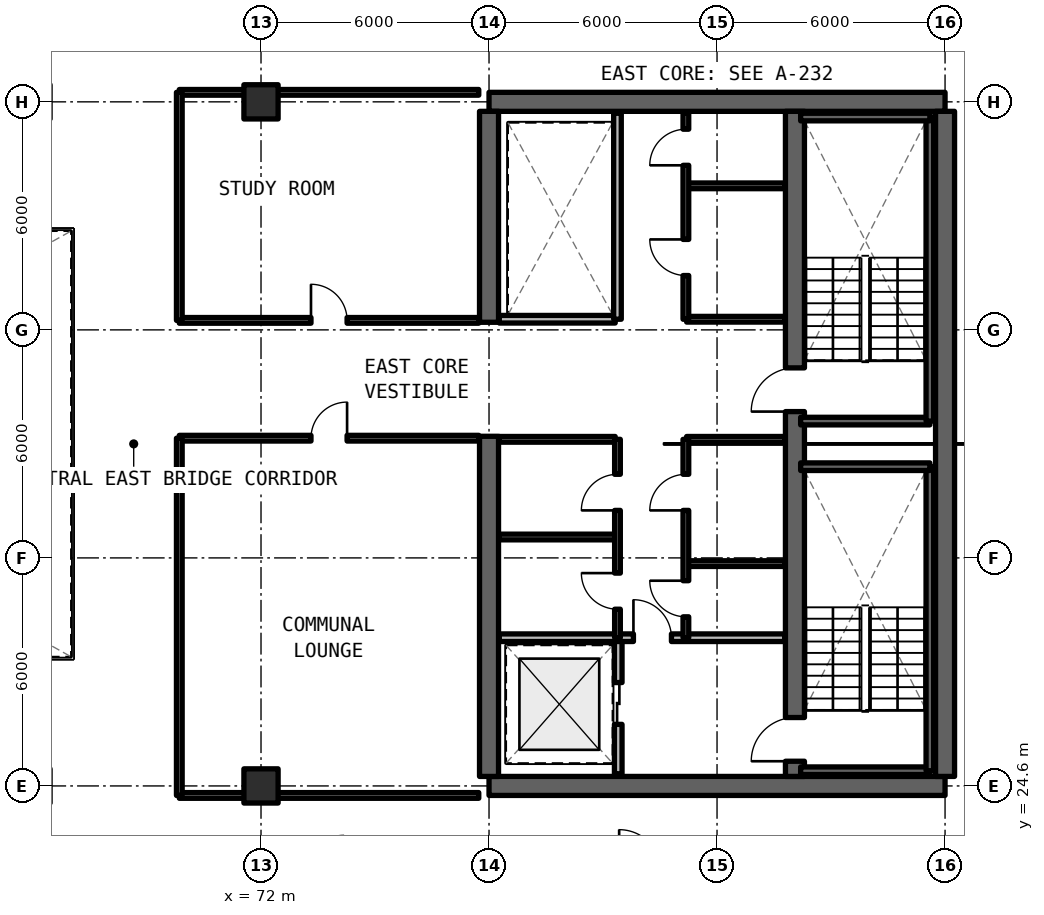
"""IFC4 building model, lengths in metres.
Left out: names, types, materials, properties, quantities, classifications, styles, units other than length and angle.
Written with IfcOpenShell. Run it as: python <this file> out.ifc"""

import sys

from ifc_helpers import new_model, si_unit, direction, frame, frame_2d, origin, origin_2d, place, context, subcontext, project, spatial, rectangle, extrude, element, fill, save


model = new_model("IFC4")
c1 = context("Model", 3, precision=1e-05, world=origin(), true_north=direction((0.0, 1.0)))
c2 = subcontext(c1, "Body", "Model", "MODEL_VIEW")
j1 = project(units=[si_unit("LENGTHUNIT", "METRE"), si_unit("PLANEANGLEUNIT", "RADIAN")], contexts=[c1])
p1 = place(None, origin())
s1 = spatial("IfcSite", under=j1, at=p1, CompositionType="ELEMENT")
p2 = place(p1, origin())
s2 = spatial("IfcBuilding", under=s1, at=p2, CompositionType="ELEMENT")
p3 = place(p2, frame((0.0, 0.0, 141.9)))
s3 = spatial("IfcBuildingStorey", under=s2, at=p3, CompositionType="ELEMENT", Elevation=141.9)
for number, where, z_axis, x_axis in (
    (1, (78.0, 24.6, 0.0), (0.0, 0.0, 1.0), (1.0, 0.0, 0.0)),
    (2, (90.0, 42.6, 0.0), (0.0, 0.0, 1.0), (-1.0, 0.0, 0.0)),
):
    element("IfcWall", number, at=place(p3, frame(where, z_axis=z_axis, x_axis=x_axis)), inside=s3, PredefinedType="SHEAR", context=c2, shape_type="SweptSolid", body=[
        extrude(rectangle(XDim=12.0, YDim=0.5, at=frame_2d((6.0, 0.0))), origin(), (0.0, 0.0, 1.0), 3.3),
    ])
p4 = place(p3, frame((90.0, 24.85, 0.0), z_axis=(0.0, 0.0, 1.0), x_axis=(0.0, 1.0, 0.0)))
e3 = element("IfcWall", 3, at=p4, inside=s3, PredefinedType="SHEAR", context=c2, shape_type="SweptSolid", body=[
    extrude(rectangle(XDim=17.5, YDim=0.5, at=frame_2d((8.75, 0.0))), origin(), (0.0, 0.0, 1.0), 3.3),
])
p5 = place(p3, frame((78.0, 24.85, 0.0), z_axis=(0.0, 0.0, 1.0), x_axis=(0.0, 1.0, 0.0)))
e4 = element("IfcWall", 4, at=p5, inside=s3, PredefinedType="SHEAR", context=c2, shape_type="SweptSolid", body=[
    extrude(rectangle(XDim=8.95, YDim=0.5, at=frame_2d((4.475, 0.0))), origin(), (0.0, 0.0, 1.0), 3.3),
])
p6 = place(p3, frame((78.0, 36.8, 0.0), z_axis=(0.0, 0.0, 1.0), x_axis=(0.0, 1.0, 0.0)))
e5 = element("IfcWall", 5, at=p6, inside=s3, PredefinedType="SHEAR", context=c2, shape_type="SweptSolid", body=[
    extrude(rectangle(XDim=5.55, YDim=0.5, at=frame_2d((2.775, 0.0))), origin(), (0.0, 0.0, 1.0), 3.3),
])
p7 = place(p3, frame((86.05, 24.85, 0.0), z_axis=(0.0, 0.0, 1.0), x_axis=(0.0, 1.0, 0.0)))
e6 = element("IfcWall", 6, at=p7, inside=s3, PredefinedType="SHEAR", context=c2, shape_type="SweptSolid", body=[
    extrude(rectangle(XDim=17.5, YDim=0.5, at=frame_2d((8.75, 0.0))), origin(), (0.0, 0.0, 1.0), 3.3),
])
p8 = place(p7, frame((0.4, 0.0, 0.0)))
e7 = element("IfcOpeningElement", 7, at=p8, cuts=e6, PredefinedType="OPENING", context=c2, shape_type="SweptSolid", body=[
    extrude(rectangle(XDim=1.15, YDim=2.15, at=frame_2d((0.575, 1.075))), frame((0.0, 0.26, 0.0), z_axis=(0.0, -1.0, 0.0), x_axis=(1.0, 0.0, 0.0)), (0.0, 0.0, 1.0), 0.52),
])
p9 = place(p7, frame((9.6, 0.0, 0.0)))
e8 = element("IfcOpeningElement", 8, at=p9, cuts=e6, PredefinedType="OPENING", context=c2, shape_type="SweptSolid", body=[
    extrude(rectangle(XDim=1.15, YDim=2.15, at=frame_2d((0.575, 1.075))), frame((0.0, 0.26, 0.0), z_axis=(0.0, -1.0, 0.0), x_axis=(1.0, 0.0, 0.0)), (0.0, 0.0, 1.0), 0.52),
])
for number, where, z_axis, x_axis in (
    (9, (72.0, 24.6, 0.0), (0.0, 0.0, 1.0), (1.0, 0.0, 0.0)),
    (10, (72.0, 42.6, 0.0), (0.0, 0.0, 1.0), (1.0, 0.0, 0.0)),
):
    element("IfcColumn", number, at=place(p3, frame(where, z_axis=z_axis, x_axis=x_axis)), inside=s3, PredefinedType="COLUMN", context=c2, shape_type="SweptSolid", body=[
        extrude(rectangle(XDim=0.9, YDim=0.9, at=origin_2d()), origin(), (0.0, 0.0, 1.0), 3.3),
    ])
p10 = place(p3, frame((81.4, 24.92, 0.0), z_axis=(0.0, 0.0, 1.0), x_axis=(0.0, 1.0, 0.0)))
e11 = element("IfcWall", 11, at=p10, inside=s3, PredefinedType="SOLIDWALL", context=c2, shape_type="SweptSolid", body=[
    extrude(rectangle(XDim=3.58, YDim=0.2, at=frame_2d((1.79, 0.0))), origin(), (0.0, 0.0, 1.0), 2.35),
])
p11 = place(p10, frame((1.3, 0.0, 0.0)))
e12 = element("IfcOpeningElement", 12, at=p11, cuts=e11, PredefinedType="OPENING", context=c2, shape_type="SweptSolid", body=[
    extrude(rectangle(XDim=1.1, YDim=2.2, at=frame_2d((0.55, 1.1))), frame((0.0, 0.11, 0.0), z_axis=(0.0, -1.0, 0.0), x_axis=(1.0, 0.0, 0.0)), (0.0, 0.0, 1.0), 0.22),
])
p12 = place(p3, frame((78.27, 28.5, 0.0), z_axis=(0.0, 0.0, 1.0), x_axis=(1.0, 0.0, 0.0)))
e13 = element("IfcWall", 13, at=p12, inside=s3, PredefinedType="SOLIDWALL", context=c2, shape_type="SweptSolid", body=[
    extrude(rectangle(XDim=7.51, YDim=0.2, at=frame_2d((3.755, 0.0))), origin(), (0.0, 0.0, 1.0), 2.35),
])
p13 = place(p12, frame((3.53, 0.0, 0.0)))
e14 = element("IfcOpeningElement", 14, at=p13, cuts=e13, PredefinedType="OPENING", context=c2, shape_type="SweptSolid", body=[
    extrude(rectangle(XDim=1.0, YDim=2.15, at=frame_2d((0.5, 1.075))), frame((0.0, 0.11, 0.0), z_axis=(0.0, -1.0, 0.0), x_axis=(1.0, 0.0, 0.0)), (0.0, 0.0, 1.0), 0.22),
])
for number, where, z_axis, x_axis in (
    (15, (83.2, 30.45, 0.0), (0.0, 0.0, 1.0), (1.0, 0.0, 0.0)),
    (16, (83.2, 33.72, 0.0), (0.0, 0.0, 1.0), (1.0, 0.0, 0.0)),
):
    element("IfcWall", number, at=place(p3, frame(where, z_axis=z_axis, x_axis=x_axis)), inside=s3, PredefinedType="SOLIDWALL", context=c2, shape_type="SweptSolid", body=[
        extrude(rectangle(XDim=2.58, YDim=0.15, at=frame_2d((1.29, 0.0))), origin(), (0.0, 0.0, 1.0), 2.35),
    ])
p14 = place(p3, frame((83.18, 28.5, 0.0), z_axis=(0.0, 0.0, 1.0), x_axis=(0.0, 1.0, 0.0)))
e17 = element("IfcWall", 17, at=p14, inside=s3, PredefinedType="SOLIDWALL", context=c2, shape_type="SweptSolid", body=[
    extrude(rectangle(XDim=5.22, YDim=0.15, at=frame_2d((2.61, 0.0))), origin(), (0.0, 0.0, 1.0), 2.35),
])
p15 = place(p14, frame((0.55, 0.0, 0.0)))
e18 = element("IfcOpeningElement", 18, at=p15, cuts=e17, PredefinedType="OPENING", context=c2, shape_type="SweptSolid", body=[
    extrude(rectangle(XDim=0.95, YDim=2.15, at=frame_2d((0.475, 1.075))), frame((0.0, 0.085, 0.0), z_axis=(0.0, -1.0, 0.0), x_axis=(1.0, 0.0, 0.0)), (0.0, 0.0, 1.0), 0.17),
])
p16 = place(p14, frame((3.35, 0.0, 0.0)))
e19 = element("IfcOpeningElement", 19, at=p16, cuts=e17, PredefinedType="OPENING", context=c2, shape_type="SweptSolid", body=[
    extrude(rectangle(XDim=0.95, YDim=2.15, at=frame_2d((0.475, 1.075))), frame((0.0, 0.085, 0.0), z_axis=(0.0, -1.0, 0.0), x_axis=(1.0, 0.0, 0.0)), (0.0, 0.0, 1.0), 0.17),
])
for number, where, z_axis, x_axis in (
    (20, (78.27, 31.15, 0.0), (0.0, 0.0, 1.0), (1.0, 0.0, 0.0)),
    (21, (78.27, 33.72, 0.0), (0.0, 0.0, 1.0), (1.0, 0.0, 0.0)),
):
    element("IfcWall", number, at=place(p3, frame(where, z_axis=z_axis, x_axis=x_axis)), inside=s3, PredefinedType="SOLIDWALL", context=c2, shape_type="SweptSolid", body=[
        extrude(rectangle(XDim=3.05, YDim=0.15, at=frame_2d((1.525, 0.0))), origin(), (0.0, 0.0, 1.0), 2.35),
    ])
p17 = place(p3, frame((81.38, 28.5, 0.0), z_axis=(0.0, 0.0, 1.0), x_axis=(0.0, 1.0, 0.0)))
e22 = element("IfcWall", 22, at=p17, inside=s3, PredefinedType="SOLIDWALL", context=c2, shape_type="SweptSolid", body=[
    extrude(rectangle(XDim=5.22, YDim=0.15, at=frame_2d((2.61, 0.0))), origin(), (0.0, 0.0, 1.0), 2.35),
])
p18 = place(p17, frame((0.75, 0.0, 0.0)))
e23 = element("IfcOpeningElement", 23, at=p18, cuts=e22, PredefinedType="OPENING", context=c2, shape_type="SweptSolid", body=[
    extrude(rectangle(XDim=0.95, YDim=2.15, at=frame_2d((0.475, 1.075))), frame((0.0, 0.085, 0.0), z_axis=(0.0, -1.0, 0.0), x_axis=(1.0, 0.0, 0.0)), (0.0, 0.0, 1.0), 0.17),
])
p19 = place(p17, frame((3.35, 0.0, 0.0)))
e24 = element("IfcOpeningElement", 24, at=p19, cuts=e22, PredefinedType="OPENING", context=c2, shape_type="SweptSolid", body=[
    extrude(rectangle(XDim=0.95, YDim=2.15, at=frame_2d((0.475, 1.075))), frame((0.0, 0.085, 0.0), z_axis=(0.0, -1.0, 0.0), x_axis=(1.0, 0.0, 0.0)), (0.0, 0.0, 1.0), 0.17),
])
for number, where, z_axis, x_axis in (
    (25, (83.2, 36.88, 0.0), (0.0, 0.0, 1.0), (1.0, 0.0, 0.0)),
    (26, (83.2, 40.39, 0.0), (0.0, 0.0, 1.0), (1.0, 0.0, 0.0)),
):
    element("IfcWall", number, at=place(p3, frame(where, z_axis=z_axis, x_axis=x_axis)), inside=s3, PredefinedType="SOLIDWALL", context=c2, shape_type="SweptSolid", body=[
        extrude(rectangle(XDim=2.58, YDim=0.15, at=frame_2d((1.29, 0.0))), origin(), (0.0, 0.0, 1.0), 2.35),
    ])
p20 = place(p3, frame((83.18, 36.88, 0.0), z_axis=(0.0, 0.0, 1.0), x_axis=(0.0, 1.0, 0.0)))
e27 = element("IfcWall", 27, at=p20, inside=s3, PredefinedType="SOLIDWALL", context=c2, shape_type="SweptSolid", body=[
    extrude(rectangle(XDim=5.42, YDim=0.15, at=frame_2d((2.71, 0.0))), origin(), (0.0, 0.0, 1.0), 2.35),
])
p21 = place(p20, frame((1.15, 0.0, 0.0)))
e28 = element("IfcOpeningElement", 28, at=p21, cuts=e27, PredefinedType="OPENING", context=c2, shape_type="SweptSolid", body=[
    extrude(rectangle(XDim=0.95, YDim=2.15, at=frame_2d((0.475, 1.075))), frame((0.0, 0.085, 0.0), z_axis=(0.0, -1.0, 0.0), x_axis=(1.0, 0.0, 0.0)), (0.0, 0.0, 1.0), 0.17),
])
p22 = place(p20, frame((4.05, 0.0, 0.0)))
e29 = element("IfcOpeningElement", 29, at=p22, cuts=e27, PredefinedType="OPENING", context=c2, shape_type="SweptSolid", body=[
    extrude(rectangle(XDim=0.95, YDim=2.15, at=frame_2d((0.475, 1.075))), frame((0.0, 0.085, 0.0), z_axis=(0.0, -1.0, 0.0), x_axis=(1.0, 0.0, 0.0)), (0.0, 0.0, 1.0), 0.17),
])
p23 = place(p3, frame((78.27, 36.88, 0.0), z_axis=(0.0, 0.0, 1.0), x_axis=(1.0, 0.0, 0.0)))
e30 = element("IfcWall", 30, at=p23, inside=s3, PredefinedType="SOLIDWALL", context=c2, shape_type="SweptSolid", body=[
    extrude(rectangle(XDim=3.05, YDim=0.2, at=frame_2d((1.525, 0.0))), origin(), (0.0, 0.0, 1.0), 2.35),
])
p24 = place(p3, frame((81.38, 36.88, 0.0), z_axis=(0.0, 0.0, 1.0), x_axis=(0.0, 1.0, 0.0)))
e31 = element("IfcWall", 31, at=p24, inside=s3, PredefinedType="SOLIDWALL", context=c2, shape_type="SweptSolid", body=[
    extrude(rectangle(XDim=5.42, YDim=0.2, at=frame_2d((2.71, 0.0))), origin(), (0.0, 0.0, 1.0), 2.35),
])
p25 = place(p3, frame((69.85, 24.35, 0.0), z_axis=(0.0, 0.0, 1.0), x_axis=(1.0, 0.0, 0.0)))
e32 = element("IfcWall", 32, at=p25, inside=s3, PredefinedType="SOLIDWALL", context=c2, shape_type="SweptSolid", body=[
    extrude(rectangle(XDim=7.88, YDim=0.15, at=frame_2d((3.94, 0.0))), origin(), (0.0, 0.0, 1.0), 2.35),
])
p26 = place(p3, frame((69.85, 33.75, 0.0), z_axis=(0.0, 0.0, 1.0), x_axis=(1.0, 0.0, 0.0)))
e33 = element("IfcWall", 33, at=p26, inside=s3, PredefinedType="SOLIDWALL", context=c2, shape_type="SweptSolid", body=[
    extrude(rectangle(XDim=7.88, YDim=0.15, at=frame_2d((3.94, 0.0))), origin(), (0.0, 0.0, 1.0), 2.35),
])
p27 = place(p26, frame((3.465, 0.0, 0.0)))
e34 = element("IfcOpeningElement", 34, at=p27, cuts=e33, PredefinedType="OPENING", context=c2, shape_type="SweptSolid", body=[
    extrude(rectangle(XDim=0.95, YDim=2.15, at=frame_2d((0.475, 1.075))), frame((0.0, 0.085, 0.0), z_axis=(0.0, -1.0, 0.0), x_axis=(1.0, 0.0, 0.0)), (0.0, 0.0, 1.0), 0.17),
])
p28 = place(p3, frame((69.85, 24.35, 0.0), z_axis=(0.0, 0.0, 1.0), x_axis=(0.0, 1.0, 0.0)))
e35 = element("IfcWall", 35, at=p28, inside=s3, PredefinedType="SOLIDWALL", context=c2, shape_type="SweptSolid", body=[
    extrude(rectangle(XDim=9.4, YDim=0.15, at=frame_2d((4.7, 0.0))), origin(), (0.0, 0.0, 1.0), 2.35),
])
p29 = place(p3, frame((69.85, 36.85, 0.0), z_axis=(0.0, 0.0, 1.0), x_axis=(1.0, 0.0, 0.0)))
e36 = element("IfcWall", 36, at=p29, inside=s3, PredefinedType="SOLIDWALL", context=c2, shape_type="SweptSolid", body=[
    extrude(rectangle(XDim=7.88, YDim=0.15, at=frame_2d((3.94, 0.0))), origin(), (0.0, 0.0, 1.0), 2.35),
])
p30 = place(p29, frame((3.465, 0.0, 0.0)))
e37 = element("IfcOpeningElement", 37, at=p30, cuts=e36, PredefinedType="OPENING", context=c2, shape_type="SweptSolid", body=[
    extrude(rectangle(XDim=0.95, YDim=2.15, at=frame_2d((0.475, 1.075))), frame((0.0, 0.085, 0.0), z_axis=(0.0, -1.0, 0.0), x_axis=(1.0, 0.0, 0.0)), (0.0, 0.0, 1.0), 0.17),
])
p31 = place(p3, frame((69.85, 42.85, 0.0), z_axis=(0.0, 0.0, 1.0), x_axis=(1.0, 0.0, 0.0)))
e38 = element("IfcWall", 38, at=p31, inside=s3, PredefinedType="SOLIDWALL", context=c2, shape_type="SweptSolid", body=[
    extrude(rectangle(XDim=7.88, YDim=0.15, at=frame_2d((3.94, 0.0))), origin(), (0.0, 0.0, 1.0), 2.35),
])
p32 = place(p3, frame((69.85, 36.85, 0.0), z_axis=(0.0, 0.0, 1.0), x_axis=(0.0, 1.0, 0.0)))
e39 = element("IfcWall", 39, at=p32, inside=s3, PredefinedType="SOLIDWALL", context=c2, shape_type="SweptSolid", body=[
    extrude(rectangle(XDim=6.0, YDim=0.15, at=frame_2d((3.0, 0.0))), origin(), (0.0, 0.0, 1.0), 2.35),
])
p33 = place(p3, frame((86.2, 25.0, 0.0), z_axis=(0.0, 0.0, 1.0), x_axis=(1.0, 0.0, 0.0)))
e40 = element("IfcWall", 40, at=p33, inside=s3, PredefinedType="SOLIDWALL", context=c2, shape_type="SweptSolid", body=[
    extrude(rectangle(XDim=3.4, YDim=0.2, at=frame_2d((1.7, 0.0))), origin(), (0.0, 0.0, 1.0), 3.3),
])
p34 = place(p3, frame((89.6, 25.0, 0.0), z_axis=(0.0, 0.0, 1.0), x_axis=(0.0, 1.0, 0.0)))
e41 = element("IfcWall", 41, at=p34, inside=s3, PredefinedType="SOLIDWALL", context=c2, shape_type="SweptSolid", body=[
    extrude(rectangle(XDim=8.0, YDim=0.2, at=frame_2d((4.0, 0.0))), origin(), (0.0, 0.0, 1.0), 3.3),
])
for number, where, z_axis, x_axis in (
    (42, (89.6, 33.0, 0.0), (0.0, 0.0, 1.0), (-1.0, 0.0, 0.0)),
    (43, (86.2, 34.2, 0.0), (0.0, 0.0, 1.0), (1.0, 0.0, 0.0)),
):
    element("IfcWall", number, at=place(p3, frame(where, z_axis=z_axis, x_axis=x_axis)), inside=s3, PredefinedType="SOLIDWALL", context=c2, shape_type="SweptSolid", body=[
        extrude(rectangle(XDim=3.4, YDim=0.2, at=frame_2d((1.7, 0.0))), origin(), (0.0, 0.0, 1.0), 3.3),
    ])
p35 = place(p3, frame((89.6, 34.2, 0.0), z_axis=(0.0, 0.0, 1.0), x_axis=(0.0, 1.0, 0.0)))
e44 = element("IfcWall", 44, at=p35, inside=s3, PredefinedType="SOLIDWALL", context=c2, shape_type="SweptSolid", body=[
    extrude(rectangle(XDim=8.0, YDim=0.2, at=frame_2d((4.0, 0.0))), origin(), (0.0, 0.0, 1.0), 3.3),
])
p36 = place(p3, frame((89.6, 42.2, 0.0), z_axis=(0.0, 0.0, 1.0), x_axis=(-1.0, 0.0, 0.0)))
e45 = element("IfcWall", 45, at=p36, inside=s3, PredefinedType="SOLIDWALL", context=c2, shape_type="SweptSolid", body=[
    extrude(rectangle(XDim=3.4, YDim=0.2, at=frame_2d((1.7, 0.0))), origin(), (0.0, 0.0, 1.0), 3.3),
])
p37 = place(p11, origin())
e46 = element("IfcDoor", 46, at=p37, inside=s3, OperationType="SLIDING_TO_LEFT", PredefinedType="DOOR", context=c2, shape_type="SweptSolid", body=[
    extrude(rectangle(XDim=1.1, YDim=2.2, at=frame_2d((0.55, 1.1))), frame((0.0, 0.025, 0.0), z_axis=(0.0, -1.0, 0.0), x_axis=(1.0, 0.0, 0.0)), (0.0, 0.0, 1.0), 0.05),
])
fill(e12, e46)
p38 = place(p13, origin())
e47 = element("IfcDoor", 47, at=p38, inside=s3, OperationType="SINGLE_SWING_LEFT", PredefinedType="DOOR", context=c2, shape_type="SweptSolid", body=[
    extrude(rectangle(XDim=1.0, YDim=2.15, at=frame_2d((0.5, 1.075))), frame((0.0, 0.025, 0.0), z_axis=(0.0, -1.0, 0.0), x_axis=(1.0, 0.0, 0.0)), (0.0, 0.0, 1.0), 0.05),
])
fill(e14, e47)
p39 = place(p15, origin())
e48 = element("IfcDoor", 48, at=p39, inside=s3, OperationType="SINGLE_SWING_RIGHT", PredefinedType="DOOR", context=c2, shape_type="SweptSolid", body=[
    extrude(rectangle(XDim=0.95, YDim=2.15, at=frame_2d((0.475, 1.075))), frame((0.0, 0.025, 0.0), z_axis=(0.0, -1.0, 0.0), x_axis=(1.0, 0.0, 0.0)), (0.0, 0.0, 1.0), 0.05),
])
fill(e18, e48)
p40 = place(p16, origin())
e49 = element("IfcDoor", 49, at=p40, inside=s3, OperationType="SINGLE_SWING_LEFT", PredefinedType="DOOR", context=c2, shape_type="SweptSolid", body=[
    extrude(rectangle(XDim=0.95, YDim=2.15, at=frame_2d((0.475, 1.075))), frame((0.0, 0.025, 0.0), z_axis=(0.0, -1.0, 0.0), x_axis=(1.0, 0.0, 0.0)), (0.0, 0.0, 1.0), 0.05),
])
fill(e19, e49)
p41 = place(p18, origin())
e50 = element("IfcDoor", 50, at=p41, inside=s3, OperationType="SINGLE_SWING_RIGHT", PredefinedType="DOOR", context=c2, shape_type="SweptSolid", body=[
    extrude(rectangle(XDim=0.95, YDim=2.15, at=frame_2d((0.475, 1.075))), frame((0.0, 0.025, 0.0), z_axis=(0.0, -1.0, 0.0), x_axis=(1.0, 0.0, 0.0)), (0.0, 0.0, 1.0), 0.05),
])
fill(e23, e50)
p42 = place(p19, origin())
e51 = element("IfcDoor", 51, at=p42, inside=s3, OperationType="SINGLE_SWING_LEFT", PredefinedType="DOOR", context=c2, shape_type="SweptSolid", body=[
    extrude(rectangle(XDim=0.95, YDim=2.15, at=frame_2d((0.475, 1.075))), frame((0.0, 0.025, 0.0), z_axis=(0.0, -1.0, 0.0), x_axis=(1.0, 0.0, 0.0)), (0.0, 0.0, 1.0), 0.05),
])
fill(e24, e51)
p43 = place(p21, origin())
e52 = element("IfcDoor", 52, at=p43, inside=s3, OperationType="SINGLE_SWING_RIGHT", PredefinedType="DOOR", context=c2, shape_type="SweptSolid", body=[
    extrude(rectangle(XDim=0.95, YDim=2.15, at=frame_2d((0.475, 1.075))), frame((0.0, 0.025, 0.0), z_axis=(0.0, -1.0, 0.0), x_axis=(1.0, 0.0, 0.0)), (0.0, 0.0, 1.0), 0.05),
])
fill(e28, e52)
p44 = place(p22, origin())
e53 = element("IfcDoor", 53, at=p44, inside=s3, OperationType="SINGLE_SWING_LEFT", PredefinedType="DOOR", context=c2, shape_type="SweptSolid", body=[
    extrude(rectangle(XDim=0.95, YDim=2.15, at=frame_2d((0.475, 1.075))), frame((0.0, 0.025, 0.0), z_axis=(0.0, -1.0, 0.0), x_axis=(1.0, 0.0, 0.0)), (0.0, 0.0, 1.0), 0.05),
])
fill(e29, e53)
p45 = place(p27, origin())
e54 = element("IfcDoor", 54, at=p45, inside=s3, OperationType="SINGLE_SWING_RIGHT", PredefinedType="DOOR", context=c2, shape_type="SweptSolid", body=[
    extrude(rectangle(XDim=0.95, YDim=2.15, at=frame_2d((0.475, 1.075))), frame((0.0, 0.025, 0.0), z_axis=(0.0, -1.0, 0.0), x_axis=(1.0, 0.0, 0.0)), (0.0, 0.0, 1.0), 0.05),
])
fill(e34, e54)
p46 = place(p30, origin())
e55 = element("IfcDoor", 55, at=p46, inside=s3, OperationType="SINGLE_SWING_LEFT", PredefinedType="DOOR", context=c2, shape_type="SweptSolid", body=[
    extrude(rectangle(XDim=0.95, YDim=2.15, at=frame_2d((0.475, 1.075))), frame((0.0, 0.025, 0.0), z_axis=(0.0, -1.0, 0.0), x_axis=(1.0, 0.0, 0.0)), (0.0, 0.0, 1.0), 0.05),
])
fill(e37, e55)
p47 = place(p8, origin())
e56 = element("IfcDoor", 56, at=p47, inside=s3, OperationType="SINGLE_SWING_LEFT", PredefinedType="DOOR", context=c2, shape_type="SweptSolid", body=[
    extrude(rectangle(XDim=1.15, YDim=2.15, at=frame_2d((0.575, 1.075))), frame((0.0, 0.025, 0.0), z_axis=(0.0, -1.0, 0.0), x_axis=(1.0, 0.0, 0.0)), (0.0, 0.0, 1.0), 0.05),
])
fill(e7, e56)
p48 = place(p9, origin())
e57 = element("IfcDoor", 57, at=p48, inside=s3, OperationType="SINGLE_SWING_RIGHT", PredefinedType="DOOR", context=c2, shape_type="SweptSolid", body=[
    extrude(rectangle(XDim=1.15, YDim=2.15, at=frame_2d((0.575, 1.075))), frame((0.0, 0.025, 0.0), z_axis=(0.0, -1.0, 0.0), x_axis=(1.0, 0.0, 0.0)), (0.0, 0.0, 1.0), 0.05),
])
fill(e8, e57)
save(model, sys.argv[1])
